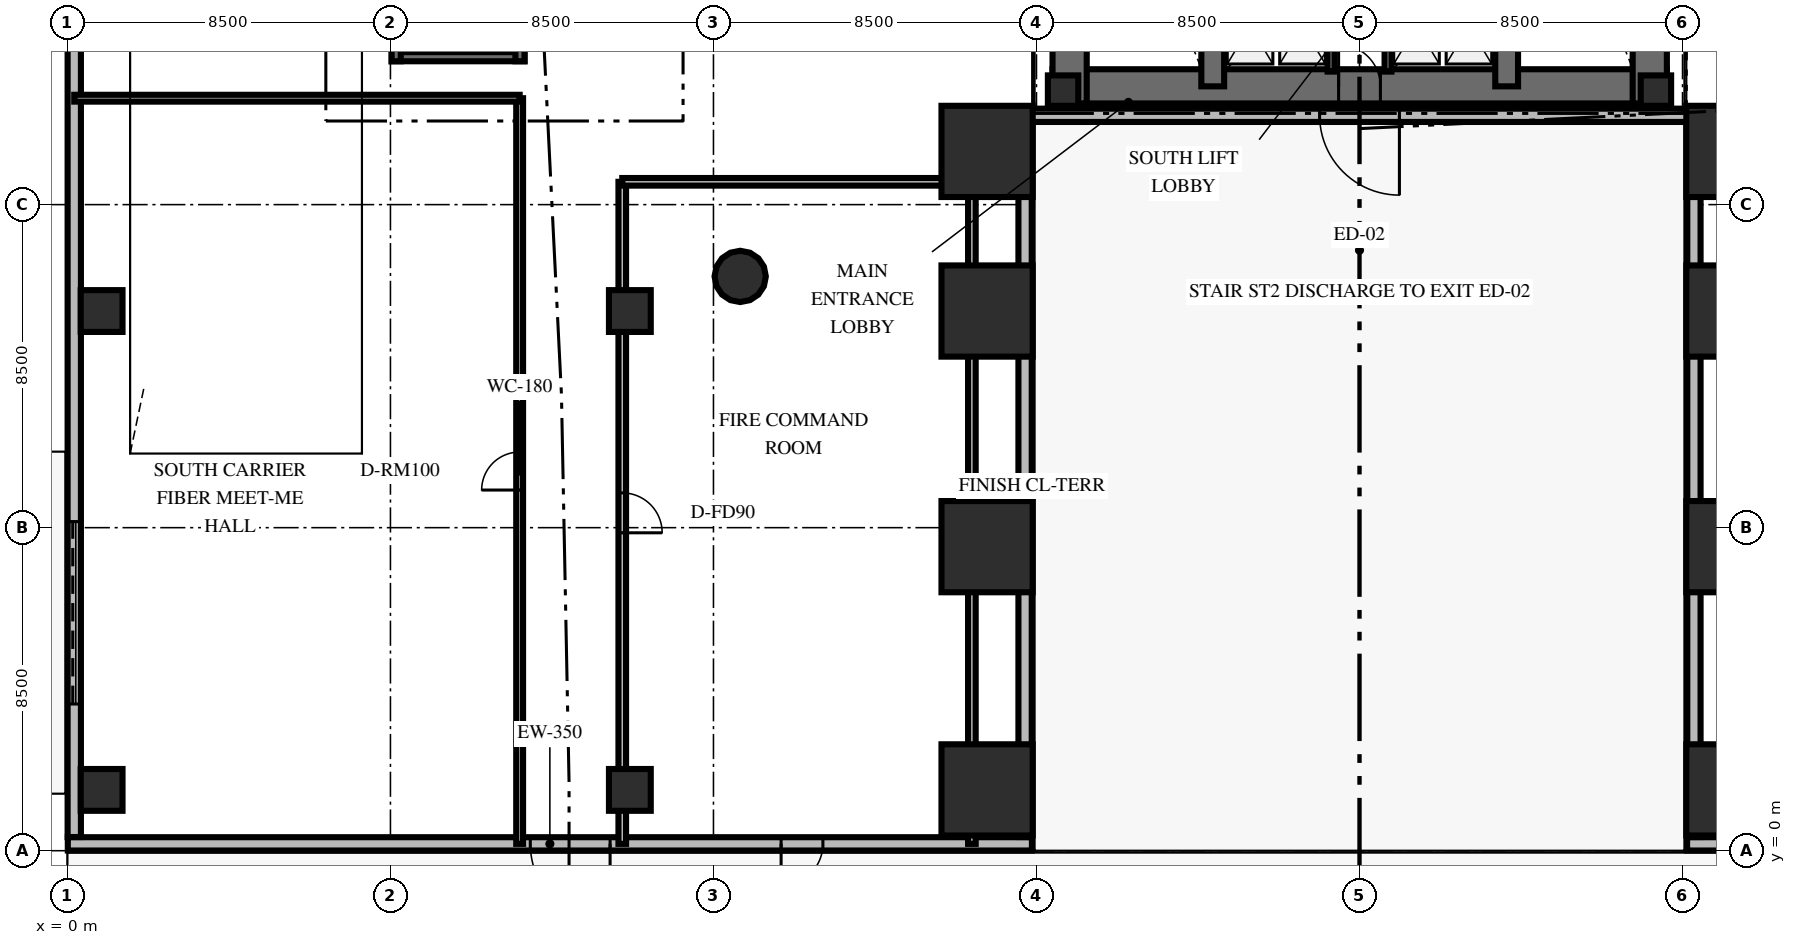
"""IFC4 building model, lengths in metres.
Left out: names, types, materials, properties, quantities, classifications, styles, units other than length and angle.
Written with IfcOpenShell. Run it as: python <this file> out.ifc"""

import sys

from ifc_helpers import new_model, si_unit, direction, frame, frame_2d, origin, origin_2d, place, context, subcontext, project, spatial, rectangle, circle, extrude, element, fill, save


model = new_model("IFC4")
c1 = context("Model", 3, precision=1e-05, world=origin(), true_north=direction((0.0, 1.0)))
c2 = subcontext(c1, "Body", "Model", "MODEL_VIEW")
j1 = project(units=[si_unit("LENGTHUNIT", "METRE"), si_unit("PLANEANGLEUNIT", "RADIAN")], contexts=[c1])
p1 = place(None, origin())
s1 = spatial("IfcSite", under=j1, at=p1, CompositionType="ELEMENT")
p2 = place(p1, origin())
s2 = spatial("IfcBuilding", under=s1, at=p2, CompositionType="ELEMENT")
p3 = place(p2, origin())
s3 = spatial("IfcBuildingStorey", under=s2, at=p3, CompositionType="ELEMENT", Elevation=0.0)
p4 = place(p3, frame((25.922, 20.112, 0.0), z_axis=(0.0, 0.0, 1.0), x_axis=(1.0, 0.0, 0.0)))
e1 = element("IfcWall", 1, at=p4, inside=s3, PredefinedType="SHEAR", context=c2, shape_type="SweptSolid", body=[
    extrude(rectangle(XDim=16.166, YDim=0.9, at=frame_2d((8.083, 0.0))), origin(), (0.0, 0.0, 1.0), 5.4),
])
p5 = place(p4, frame((7.528, 0.0, 0.0)))
e2 = element("IfcOpeningElement", 2, at=p5, cuts=e1, PredefinedType="OPENING", context=c2, shape_type="SweptSolid", body=[
    extrude(rectangle(XDim=1.1, YDim=2.15, at=frame_2d((0.55, 1.075))), frame((0.0, 0.46, 0.0), z_axis=(0.0, -1.0, 0.0), x_axis=(1.0, 0.0, 0.0)), (0.0, 0.0, 1.0), 0.92),
])
for number, where, z_axis, x_axis in (
    (3, (26.372, 19.662, 0.0), (0.0, 0.0, 1.0), (0.0, 1.0, 0.0)),
    (4, (41.638, 19.662, 0.0), (0.0, 0.0, 1.0), (0.0, 1.0, 0.0)),
):
    element("IfcWall", number, at=place(p3, frame(where, z_axis=z_axis, x_axis=x_axis)), inside=s3, PredefinedType="SHEAR", context=c2, shape_type="SweptSolid", body=[
        extrude(rectangle(XDim=10.876, YDim=0.9, at=frame_2d((5.438, 0.0))), origin(), (0.0, 0.0, 1.0), 5.4),
    ])
for number, where, z_axis, x_axis in (
    (5, (30.138, 20.112, 0.0), (0.0, 0.0, 1.0), (0.0, 1.0, 0.0)),
    (6, (37.872, 20.112, 0.0), (0.0, 0.0, 1.0), (0.0, 1.0, 0.0)),
):
    element("IfcWall", number, at=place(p3, frame(where, z_axis=z_axis, x_axis=x_axis)), inside=s3, PredefinedType="SHEAR", context=c2, shape_type="SweptSolid", body=[
        extrude(rectangle(XDim=9.976, YDim=0.6, at=frame_2d((4.988, 0.0))), origin(), (0.0, 0.0, 1.0), 5.4),
    ])
for number, where, z_axis, x_axis in (
    (7, (26.2, 20.0, 0.0), (0.0, 0.0, 1.0), (1.0, 0.0, 0.0)),
    (8, (41.8, 20.0, 0.0), (0.0, 0.0, 1.0), (1.0, 0.0, 0.0)),
):
    element("IfcColumn", number, at=place(p3, frame(where, z_axis=z_axis, x_axis=x_axis)), inside=s3, PredefinedType="PILASTER", context=c2, shape_type="SweptSolid", body=[
        extrude(rectangle(XDim=0.8, YDim=0.8, at=origin_2d()), origin(), (0.0, 0.0, 1.0), 5.4),
    ])
p6 = place(p3, frame((8.532, 20.892, 0.0), z_axis=(0.0, 0.0, 1.0), x_axis=(1.0, 0.0, 0.0)))
e9 = element("IfcWall", 9, at=p6, inside=s3, PredefinedType="SHEAR", context=c2, shape_type="SweptSolid", body=[
    extrude(rectangle(XDim=3.496, YDim=0.24, at=frame_2d((1.748, 0.0))), origin(), (0.0, 0.0, 1.0), 5.4),
])
p7 = place(p3, frame((8.652, 20.772, 0.0), z_axis=(0.0, 0.0, 1.0), x_axis=(0.0, 1.0, 0.0)))
e10 = element("IfcWall", 10, at=p7, inside=s3, PredefinedType="SHEAR", context=c2, shape_type="SweptSolid", body=[
    extrude(rectangle(XDim=9.556, YDim=0.24, at=frame_2d((4.778, 0.0))), origin(), (0.0, 0.0, 1.0), 5.4),
])
p8 = place(p3, frame((11.908, 20.772, 0.0), z_axis=(0.0, 0.0, 1.0), x_axis=(0.0, 1.0, 0.0)))
e11 = element("IfcWall", 11, at=p8, inside=s3, PredefinedType="SHEAR", context=c2, shape_type="SweptSolid", body=[
    extrude(rectangle(XDim=9.556, YDim=0.24, at=frame_2d((4.778, 0.0))), origin(), (0.0, 0.0, 1.0), 5.4),
])
p9 = place(p8, frame((0.55, 0.0, 0.0)))
e12 = element("IfcOpeningElement", 12, at=p9, cuts=e11, PredefinedType="OPENING", context=c2, shape_type="SweptSolid", body=[
    extrude(rectangle(XDim=1.05, YDim=2.15, at=frame_2d((0.525, 1.075))), frame((0.0, 0.13, 0.0), z_axis=(0.0, -1.0, 0.0), x_axis=(1.0, 0.0, 0.0)), (0.0, 0.0, 1.0), 0.26),
])
for number, where, z_axis, x_axis in (
    (13, (24.2, 1.6, 0.0), (0.0, 0.0, 1.0), (1.0, 0.0, 0.0)),
    (14, (24.2, 8.0, 0.0), (0.0, 0.0, 1.0), (1.0, 0.0, 0.0)),
    (15, (24.2, 14.2, 0.0), (0.0, 0.0, 1.0), (1.0, 0.0, 0.0)),
    (16, (24.2, 18.4, 0.0), (0.0, 0.0, 1.0), (1.0, 0.0, 0.0)),
    (17, (43.8, 1.6, 0.0), (0.0, 0.0, 1.0), (1.0, 0.0, 0.0)),
    (18, (43.8, 8.0, 0.0), (0.0, 0.0, 1.0), (1.0, 0.0, 0.0)),
    (19, (43.8, 14.2, 0.0), (0.0, 0.0, 1.0), (1.0, 0.0, 0.0)),
    (20, (43.8, 18.4, 0.0), (0.0, 0.0, 1.0), (1.0, 0.0, 0.0)),
):
    element("IfcColumn", number, at=place(p3, frame(where, z_axis=z_axis, x_axis=x_axis)), inside=s3, PredefinedType="USERDEFINED", context=c2, shape_type="SweptSolid", body=[
        extrude(rectangle(XDim=2.4, YDim=2.4, at=origin_2d()), origin(), (0.0, 0.0, 1.0), 5.4),
    ])
for number, where, z_axis, x_axis in (
    (21, (0.9, 1.6, 0.0), (0.0, 0.0, 1.0), (1.0, 0.0, 0.0)),
    (22, (0.9, 14.2, 0.0), (0.0, 0.0, 1.0), (1.0, 0.0, 0.0)),
    (23, (14.8, 1.6, 0.0), (0.0, 0.0, 1.0), (1.0, 0.0, 0.0)),
    (24, (14.8, 14.2, 0.0), (0.0, 0.0, 1.0), (1.0, 0.0, 0.0)),
):
    element("IfcColumn", number, at=place(p3, frame(where, z_axis=z_axis, x_axis=x_axis)), inside=s3, PredefinedType="COLUMN", context=c2, shape_type="SweptSolid", body=[
        extrude(rectangle(XDim=1.1, YDim=1.1, at=origin_2d()), origin(), (0.0, 0.0, 1.0), 5.4),
    ])
p10 = place(p3, frame((17.703, 15.111, 0.0), z_axis=(0.0, 0.0, 1.0), x_axis=(1.0, 0.0, 0.0)))
e25 = element("IfcColumn", 25, at=p10, inside=s3, PredefinedType="COLUMN", context=c2, shape_type="SweptSolid", body=[
    extrude(circle(Radius=0.675, at=origin_2d()), origin(), (0.0, 0.0, 1.0), 5.4),
])
p11 = place(p3, frame((25.38, 0.18, 0.0), z_axis=(0.0, 0.0, 1.0), x_axis=(-1.0, 0.0, 0.0)))
e26 = element("IfcWall", 26, at=p11, inside=s3, PredefinedType="SOLIDWALL", context=c2, shape_type="SweptSolid", body=[
    extrude(rectangle(XDim=25.37, YDim=0.35, at=frame_2d((12.685, 0.0))), origin(), (0.0, 0.0, 1.0), 4.36),
])
p12 = place(p11, frame((11.1, 0.0, 0.0)))
e27 = element("IfcOpeningElement", 27, at=p12, cuts=e26, PredefinedType="OPENING", context=c2, shape_type="SweptSolid", body=[
    extrude(rectangle(XDim=2.1, YDim=2.35, at=frame_2d((1.05, 1.175))), frame((0.0, 0.185, 0.0), z_axis=(0.0, -1.0, 0.0), x_axis=(1.0, 0.0, 0.0)), (0.0, 0.0, 1.0), 0.37),
])
p13 = place(p11, frame((5.5, 0.0, 0.0)))
e28 = element("IfcOpeningElement", 28, at=p13, cuts=e26, PredefinedType="OPENING", context=c2, shape_type="SweptSolid", body=[
    extrude(rectangle(XDim=1.1, YDim=2.2, at=frame_2d((0.55, 1.1))), frame((0.0, 0.185, 0.0), z_axis=(0.0, -1.0, 0.0), x_axis=(1.0, 0.0, 0.0)), (0.0, 0.0, 1.0), 0.37),
])
p14 = place(p3, frame((0.18, 0.36, 0.0), z_axis=(0.0, 0.0, 1.0), x_axis=(0.0, 1.0, 0.0)))
e29 = element("IfcWall", 29, at=p14, inside=s3, PredefinedType="SOLIDWALL", context=c2, shape_type="SweptSolid", body=[
    extrude(rectangle(XDim=51.28, YDim=0.35, at=frame_2d((25.64, 0.0))), origin(), (0.0, 0.0, 1.0), 4.36),
])
p15 = place(p14, frame((3.5, 0.0, 0.0)))
e30 = element("IfcOpeningElement", 30, at=p15, cuts=e29, PredefinedType="OPENING", context=c2, shape_type="SweptSolid", body=[
    extrude(rectangle(XDim=4.8, YDim=3.1, at=frame_2d((2.4, 1.55))), frame((0.0, 0.185, 0.0), z_axis=(0.0, -1.0, 0.0), x_axis=(1.0, 0.0, 0.0)), (0.0, 0.0, 1.0), 0.37),
])
p16 = place(p3, frame((67.99, 0.18, 0.0), z_axis=(0.0, 0.0, 1.0), x_axis=(-1.0, 0.0, 0.0)))
e31 = element("IfcWall", 31, at=p16, inside=s3, PredefinedType="SOLIDWALL", context=c2, shape_type="SweptSolid", body=[
    extrude(rectangle(XDim=25.37, YDim=0.35, at=frame_2d((12.685, 0.0))), origin(), (0.0, 0.0, 1.0), 4.36),
])
p17 = place(p16, frame((20.72, 0.0, 0.0)))
e32 = element("IfcOpeningElement", 32, at=p17, cuts=e31, PredefinedType="OPENING", context=c2, shape_type="SweptSolid", body=[
    extrude(rectangle(XDim=2.1, YDim=2.35, at=frame_2d((1.05, 1.175))), frame((0.0, 0.185, 0.0), z_axis=(0.0, -1.0, 0.0), x_axis=(1.0, 0.0, 0.0)), (0.0, 0.0, 1.0), 0.37),
])
p18 = place(p16, frame((6.2, 0.0, 0.0)))
e33 = element("IfcOpeningElement", 33, at=p18, cuts=e31, PredefinedType="OPENING", context=c2, shape_type="SweptSolid", body=[
    extrude(rectangle(XDim=3.6, YDim=3.6, at=frame_2d((1.8, 1.8))), frame((0.0, 0.185, 0.0), z_axis=(0.0, -1.0, 0.0), x_axis=(1.0, 0.0, 0.0)), (0.0, 0.0, 1.0), 0.37),
])
for number, where, z_axis, x_axis in (
    (34, (25.2, 19.35, 0.0), (0.0, 0.0, 1.0), (0.0, -1.0, 0.0)),
    (35, (42.8, 0.36, 0.0), (0.0, 0.0, 1.0), (0.0, 1.0, 0.0)),
):
    element("IfcWall", number, at=place(p3, frame(where, z_axis=z_axis, x_axis=x_axis)), inside=s3, PredefinedType="SOLIDWALL", context=c2, shape_type="SweptSolid", body=[
        extrude(rectangle(XDim=18.99, YDim=0.35, at=frame_2d((9.495, 0.0))), origin(), (0.0, 0.0, 1.0), 4.36),
    ])
p19 = place(p3, frame((42.62, 19.35, 0.0), z_axis=(0.0, 0.0, 1.0), x_axis=(-1.0, 0.0, 0.0)))
e36 = element("IfcWall", 36, at=p19, inside=s3, PredefinedType="SOLIDWALL", context=c2, shape_type="SweptSolid", body=[
    extrude(rectangle(XDim=17.24, YDim=0.35, at=frame_2d((8.62, 0.0))), origin(), (0.0, 0.0, 1.0), 4.36),
])
p20 = place(p19, frame((7.57, 0.0, 0.0)))
e37 = element("IfcOpeningElement", 37, at=p20, cuts=e36, PredefinedType="OPENING", context=c2, shape_type="SweptSolid", body=[
    extrude(rectangle(XDim=2.1, YDim=2.35, at=frame_2d((1.05, 1.175))), frame((0.0, 0.185, 0.0), z_axis=(0.0, -1.0, 0.0), x_axis=(1.0, 0.0, 0.0)), (0.0, 0.0, 1.0), 0.37),
])
for number, where, z_axis, x_axis in (
    (38, (33.25, 20.5, 0.0), (0.0, 0.0, 1.0), (0.0, 1.0, 0.0)),
    (39, (34.75, 20.5, 0.0), (0.0, 0.0, 1.0), (0.0, 1.0, 0.0)),
):
    element("IfcWall", number, at=place(p3, frame(where, z_axis=z_axis, x_axis=x_axis)), inside=s3, PredefinedType="SOLIDWALL", context=c2, shape_type="SweptSolid", body=[
        extrude(rectangle(XDim=2.42, YDim=0.18, at=frame_2d((1.21, 0.0))), origin(), (0.0, 0.0, 1.0), 4.16),
    ])
p21 = place(p3, frame((14.6, 17.6, 0.0), z_axis=(0.0, 0.0, 1.0), x_axis=(0.0, -1.0, 0.0)))
e40 = element("IfcWall", 40, at=p21, inside=s3, PredefinedType="SOLIDWALL", context=c2, shape_type="SweptSolid", body=[
    extrude(rectangle(XDim=17.42, YDim=0.2, at=frame_2d((8.71, 0.0))), origin(), (0.0, 0.0, 1.0), 4.16),
])
p22 = place(p21, frame((8.185, 0.0, 0.0)))
e41 = element("IfcOpeningElement", 41, at=p22, cuts=e40, PredefinedType="OPENING", context=c2, shape_type="SweptSolid", body=[
    extrude(rectangle(XDim=1.05, YDim=2.15, at=frame_2d((0.525, 1.075))), frame((0.0, 0.11, 0.0), z_axis=(0.0, -1.0, 0.0), x_axis=(1.0, 0.0, 0.0)), (0.0, 0.0, 1.0), 0.22),
])
p23 = place(p3, frame((23.8, 0.18, 0.0), z_axis=(0.0, 0.0, 1.0), x_axis=(0.0, 1.0, 0.0)))
e42 = element("IfcWall", 42, at=p23, inside=s3, PredefinedType="SOLIDWALL", context=c2, shape_type="SweptSolid", body=[
    extrude(rectangle(XDim=17.42, YDim=0.2, at=frame_2d((8.71, 0.0))), origin(), (0.0, 0.0, 1.0), 4.16),
])
p24 = place(p3, frame((23.8, 17.6, 0.0), z_axis=(0.0, 0.0, 1.0), x_axis=(-1.0, 0.0, 0.0)))
e43 = element("IfcWall", 43, at=p24, inside=s3, PredefinedType="SOLIDWALL", context=c2, shape_type="SweptSolid", body=[
    extrude(rectangle(XDim=9.2, YDim=0.2, at=frame_2d((4.6, 0.0))), origin(), (0.0, 0.0, 1.0), 4.16),
])
p25 = place(p3, frame((11.9, 0.18, 0.0), z_axis=(0.0, 0.0, 1.0), x_axis=(0.0, 1.0, 0.0)))
e44 = element("IfcWall", 44, at=p25, inside=s3, PredefinedType="PARTITIONING", context=c2, shape_type="SweptSolid", body=[
    extrude(rectangle(XDim=19.62, YDim=0.18, at=frame_2d((9.81, 0.0))), origin(), (0.0, 0.0, 1.0), 4.16),
])
p26 = place(p25, frame((9.31, 0.0, 0.0)))
e45 = element("IfcOpeningElement", 45, at=p26, cuts=e44, PredefinedType="OPENING", context=c2, shape_type="SweptSolid", body=[
    extrude(rectangle(XDim=1.0, YDim=2.15, at=frame_2d((0.5, 1.075))), frame((0.0, 0.1, 0.0), z_axis=(0.0, -1.0, 0.0), x_axis=(1.0, 0.0, 0.0)), (0.0, 0.0, 1.0), 0.2),
])
p27 = place(p3, frame((11.9, 19.8, 0.0), z_axis=(0.0, 0.0, 1.0), x_axis=(-1.0, 0.0, 0.0)))
e46 = element("IfcWall", 46, at=p27, inside=s3, PredefinedType="PARTITIONING", context=c2, shape_type="SweptSolid", body=[
    extrude(rectangle(XDim=11.72, YDim=0.18, at=frame_2d((5.86, 0.0))), origin(), (0.0, 0.0, 1.0), 4.16),
])
p28 = place(p12, origin())
e47 = element("IfcDoor", 47, at=p28, inside=s3, OperationType="DOUBLE_DOOR_SINGLE_SWING", PredefinedType="DOOR", context=c2, shape_type="SweptSolid", body=[
    extrude(rectangle(XDim=2.1, YDim=2.35, at=frame_2d((1.05, 1.175))), frame((0.0, 0.025, 0.0), z_axis=(0.0, -1.0, 0.0), x_axis=(1.0, 0.0, 0.0)), (0.0, 0.0, 1.0), 0.05),
])
fill(e27, e47)
p29 = place(p13, origin())
e48 = element("IfcDoor", 48, at=p29, inside=s3, OperationType="SINGLE_SWING_RIGHT", PredefinedType="DOOR", context=c2, shape_type="SweptSolid", body=[
    extrude(rectangle(XDim=1.1, YDim=2.2, at=frame_2d((0.55, 1.1))), frame((0.0, 0.025, 0.0), z_axis=(0.0, -1.0, 0.0), x_axis=(1.0, 0.0, 0.0)), (0.0, 0.0, 1.0), 0.05),
])
fill(e28, e48)
p30 = place(p15, origin())
e49 = element("IfcDoor", 49, at=p30, inside=s3, OperationType="ROLLINGUP", PredefinedType="GATE", context=c2, shape_type="SweptSolid", body=[
    extrude(rectangle(XDim=4.8, YDim=3.1, at=frame_2d((2.4, 1.55))), frame((0.0, 0.025, 0.0), z_axis=(0.0, -1.0, 0.0), x_axis=(1.0, 0.0, 0.0)), (0.0, 0.0, 1.0), 0.05),
])
fill(e30, e49)
p31 = place(p20, origin())
e50 = element("IfcDoor", 50, at=p31, inside=s3, OperationType="DOUBLE_DOOR_SINGLE_SWING", PredefinedType="DOOR", context=c2, shape_type="SweptSolid", body=[
    extrude(rectangle(XDim=2.1, YDim=2.35, at=frame_2d((1.05, 1.175))), frame((0.0, 0.025, 0.0), z_axis=(0.0, -1.0, 0.0), x_axis=(1.0, 0.0, 0.0)), (0.0, 0.0, 1.0), 0.05),
])
fill(e37, e50)
p32 = place(p5, origin())
e51 = element("IfcDoor", 51, at=p32, inside=s3, OperationType="SINGLE_SWING_LEFT", PredefinedType="DOOR", context=c2, shape_type="SweptSolid", body=[
    extrude(rectangle(XDim=1.1, YDim=2.15, at=frame_2d((0.55, 1.075))), frame((0.0, 0.025, 0.0), z_axis=(0.0, -1.0, 0.0), x_axis=(1.0, 0.0, 0.0)), (0.0, 0.0, 1.0), 0.05),
])
fill(e2, e51)
p33 = place(p22, origin())
e52 = element("IfcDoor", 52, at=p33, inside=s3, OperationType="SINGLE_SWING_RIGHT", PredefinedType="DOOR", context=c2, shape_type="SweptSolid", body=[
    extrude(rectangle(XDim=1.05, YDim=2.15, at=frame_2d((0.525, 1.075))), frame((0.0, 0.025, 0.0), z_axis=(0.0, -1.0, 0.0), x_axis=(1.0, 0.0, 0.0)), (0.0, 0.0, 1.0), 0.05),
])
fill(e41, e52)
p34 = place(p26, origin())
e53 = element("IfcDoor", 53, at=p34, inside=s3, OperationType="SINGLE_SWING_LEFT", PredefinedType="DOOR", context=c2, shape_type="SweptSolid", body=[
    extrude(rectangle(XDim=1.0, YDim=2.15, at=frame_2d((0.5, 1.075))), frame((0.0, 0.025, 0.0), z_axis=(0.0, -1.0, 0.0), x_axis=(1.0, 0.0, 0.0)), (0.0, 0.0, 1.0), 0.05),
])
fill(e45, e53)
save(model, sys.argv[1])
